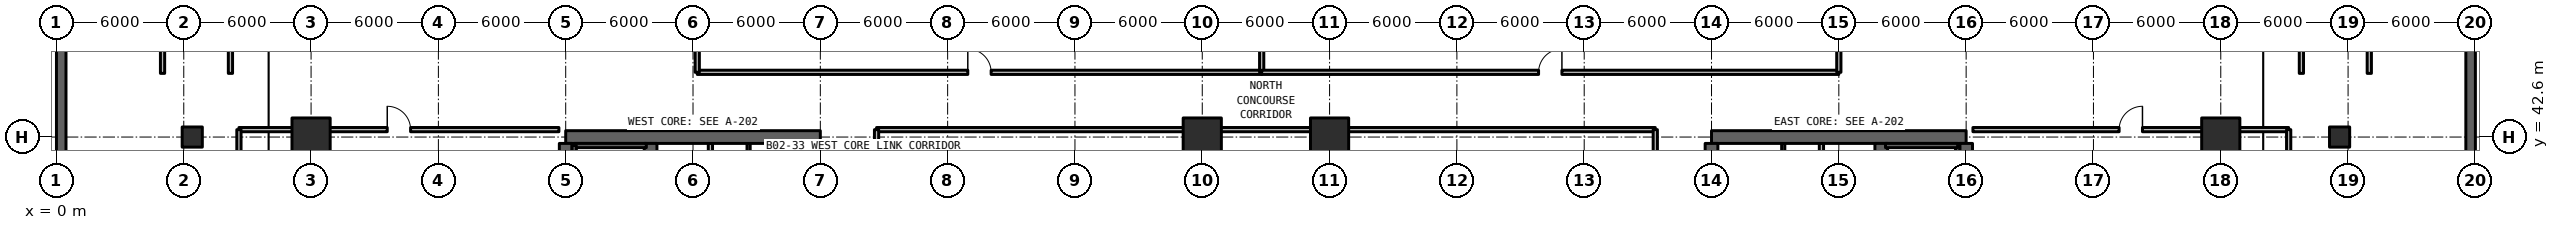
"""IFC4 building model, lengths in metres.
Left out: names, types, materials, properties, quantities, classifications, styles, units other than length and angle.
Written with IfcOpenShell. Run it as: python <this file> out.ifc"""

import sys

from ifc_helpers import new_model, si_unit, direction, frame, frame_2d, origin, origin_2d, place, context, subcontext, project, spatial, rectangle, extrude, element, fill, save


model = new_model("IFC4")
c1 = context("Model", 3, precision=1e-05, world=origin(), true_north=direction((0.0, 1.0)))
c2 = subcontext(c1, "Body", "Model", "MODEL_VIEW")
j1 = project(units=[si_unit("LENGTHUNIT", "METRE"), si_unit("PLANEANGLEUNIT", "RADIAN")], contexts=[c1])
p1 = place(None, origin())
s1 = spatial("IfcSite", under=j1, at=p1, CompositionType="ELEMENT")
p2 = place(p1, origin())
s2 = spatial("IfcBuilding", under=s1, at=p2, CompositionType="ELEMENT")
p3 = place(p2, frame((0.0, 0.0, -9.24)))
s3 = spatial("IfcBuildingStorey", under=s2, at=p3, CompositionType="ELEMENT", Elevation=-9.24)
p4 = place(p3, frame((36.0, 42.6, 0.0), z_axis=(0.0, 0.0, 1.0), x_axis=(-1.0, 0.0, 0.0)))
e1 = element("IfcWall", 1, at=p4, inside=s3, PredefinedType="SHEAR", context=c2, shape_type="SweptSolid", body=[
    extrude(rectangle(XDim=12.0, YDim=0.6, at=frame_2d((6.0, 0.0))), origin(), (0.0, 0.0, 1.0), 4.62),
])
p5 = place(p3, frame((24.0, 24.9, 0.0), z_axis=(0.0, 0.0, 1.0), x_axis=(0.0, 1.0, 0.0)))
e2 = element("IfcWall", 2, at=p5, inside=s3, PredefinedType="SHEAR", context=c2, shape_type="SweptSolid", body=[
    extrude(rectangle(XDim=17.4, YDim=0.6, at=frame_2d((8.7, 0.0))), origin(), (0.0, 0.0, 1.0), 4.62),
])
p6 = place(p3, frame((36.0, 36.8, 0.0), z_axis=(0.0, 0.0, 1.0), x_axis=(0.0, 1.0, 0.0)))
e3 = element("IfcWall", 3, at=p6, inside=s3, PredefinedType="SHEAR", context=c2, shape_type="SweptSolid", body=[
    extrude(rectangle(XDim=5.5, YDim=0.6, at=frame_2d((2.75, 0.0))), origin(), (0.0, 0.0, 1.0), 4.62),
])
p7 = place(p3, frame((28.0, 24.9, 0.0), z_axis=(0.0, 0.0, 1.0), x_axis=(0.0, 1.0, 0.0)))
e4 = element("IfcWall", 4, at=p7, inside=s3, PredefinedType="SHEAR", context=c2, shape_type="SweptSolid", body=[
    extrude(rectangle(XDim=17.4, YDim=0.6, at=frame_2d((8.7, 0.0))), origin(), (0.0, 0.0, 1.0), 4.62),
])
p8 = place(p7, frame((0.35, 0.0, 0.0)))
e5 = element("IfcOpeningElement", 5, at=p8, cuts=e4, PredefinedType="OPENING", context=c2, shape_type="SweptSolid", body=[
    extrude(rectangle(XDim=1.15, YDim=2.15, at=frame_2d((0.575, 1.075))), frame((0.0, 0.31, 0.0), z_axis=(0.0, -1.0, 0.0), x_axis=(1.0, 0.0, 0.0)), (0.0, 0.0, 1.0), 0.62),
])
p9 = place(p7, frame((9.55, 0.0, 0.0)))
e6 = element("IfcOpeningElement", 6, at=p9, cuts=e4, PredefinedType="OPENING", context=c2, shape_type="SweptSolid", body=[
    extrude(rectangle(XDim=1.15, YDim=2.15, at=frame_2d((0.575, 1.075))), frame((0.0, 0.31, 0.0), z_axis=(0.0, -1.0, 0.0), x_axis=(1.0, 0.0, 0.0)), (0.0, 0.0, 1.0), 0.62),
])
p10 = place(p3, frame((90.0, 42.6, 0.0), z_axis=(0.0, 0.0, 1.0), x_axis=(-1.0, 0.0, 0.0)))
e7 = element("IfcWall", 7, at=p10, inside=s3, PredefinedType="SHEAR", context=c2, shape_type="SweptSolid", body=[
    extrude(rectangle(XDim=12.0, YDim=0.6, at=frame_2d((6.0, 0.0))), origin(), (0.0, 0.0, 1.0), 4.62),
])
p11 = place(p3, frame((90.0, 24.9, 0.0), z_axis=(0.0, 0.0, 1.0), x_axis=(0.0, 1.0, 0.0)))
e8 = element("IfcWall", 8, at=p11, inside=s3, PredefinedType="SHEAR", context=c2, shape_type="SweptSolid", body=[
    extrude(rectangle(XDim=17.4, YDim=0.6, at=frame_2d((8.7, 0.0))), origin(), (0.0, 0.0, 1.0), 4.62),
])
p12 = place(p3, frame((78.0, 36.8, 0.0), z_axis=(0.0, 0.0, 1.0), x_axis=(0.0, 1.0, 0.0)))
e9 = element("IfcWall", 9, at=p12, inside=s3, PredefinedType="SHEAR", context=c2, shape_type="SweptSolid", body=[
    extrude(rectangle(XDim=5.5, YDim=0.6, at=frame_2d((2.75, 0.0))), origin(), (0.0, 0.0, 1.0), 4.62),
])
p13 = place(p3, frame((86.0, 24.9, 0.0), z_axis=(0.0, 0.0, 1.0), x_axis=(0.0, 1.0, 0.0)))
e10 = element("IfcWall", 10, at=p13, inside=s3, PredefinedType="SHEAR", context=c2, shape_type="SweptSolid", body=[
    extrude(rectangle(XDim=17.4, YDim=0.6, at=frame_2d((8.7, 0.0))), origin(), (0.0, 0.0, 1.0), 4.62),
])
p14 = place(p13, frame((0.35, 0.0, 0.0)))
e11 = element("IfcOpeningElement", 11, at=p14, cuts=e10, PredefinedType="OPENING", context=c2, shape_type="SweptSolid", body=[
    extrude(rectangle(XDim=1.15, YDim=2.15, at=frame_2d((0.575, 1.075))), frame((0.0, 0.31, 0.0), z_axis=(0.0, -1.0, 0.0), x_axis=(1.0, 0.0, 0.0)), (0.0, 0.0, 1.0), 0.62),
])
p15 = place(p13, frame((9.55, 0.0, 0.0)))
e12 = element("IfcOpeningElement", 12, at=p15, cuts=e10, PredefinedType="OPENING", context=c2, shape_type="SweptSolid", body=[
    extrude(rectangle(XDim=1.15, YDim=2.15, at=frame_2d((0.575, 1.075))), frame((0.0, 0.31, 0.0), z_axis=(0.0, -1.0, 0.0), x_axis=(1.0, 0.0, 0.0)), (0.0, 0.0, 1.0), 0.62),
])
for number, where, z_axis, x_axis in (
    (13, (12.0, 42.6, 0.0), (0.0, 0.0, 1.0), (1.0, 0.0, 0.0)),
    (14, (54.0, 42.6, 0.0), (0.0, 0.0, 1.0), (1.0, 0.0, 0.0)),
    (15, (60.0, 42.6, 0.0), (0.0, 0.0, 1.0), (1.0, 0.0, 0.0)),
    (16, (102.0, 42.6, 0.0), (0.0, 0.0, 1.0), (1.0, 0.0, 0.0)),
):
    element("IfcColumn", number, at=place(p3, frame(where, z_axis=z_axis, x_axis=x_axis)), inside=s3, PredefinedType="COLUMN", context=c2, shape_type="SweptSolid", body=[
        extrude(rectangle(XDim=1.8, YDim=1.8, at=origin_2d()), origin(), (0.0, 0.0, 1.0), 4.62),
    ])
for number, where, z_axis, x_axis in (
    (17, (6.4, 42.6, 0.0), (0.0, 0.0, 1.0), (1.0, 0.0, 0.0)),
    (18, (107.6, 42.6, 0.0), (0.0, 0.0, 1.0), (1.0, 0.0, 0.0)),
):
    element("IfcColumn", number, at=place(p3, frame(where, z_axis=z_axis, x_axis=x_axis)), inside=s3, PredefinedType="COLUMN", context=c2, shape_type="SweptSolid", body=[
        extrude(rectangle(XDim=0.95, YDim=0.95, at=origin_2d()), origin(), (0.0, 0.0, 1.0), 4.62),
    ])
for number, where, z_axis, x_axis in (
    (19, (113.775, 0.225, 0.0), (0.0, 0.0, 1.0), (0.0, 1.0, 0.0)),
    (20, (0.225, 66.975, 0.0), (0.0, 0.0, 1.0), (0.0, -1.0, 0.0)),
):
    element("IfcWall", number, at=place(p3, frame(where, z_axis=z_axis, x_axis=x_axis)), inside=s3, PredefinedType="USERDEFINED", context=c2, shape_type="SweptSolid", body=[
        extrude(rectangle(XDim=66.75, YDim=0.45, at=frame_2d((33.375, 0.0))), origin(), (0.0, 0.0, 1.0), 4.32),
    ])
p16 = place(p3, frame((30.82, 36.88, 0.0), z_axis=(0.0, 0.0, 1.0), x_axis=(0.0, 1.0, 0.0)))
e21 = element("IfcWall", 21, at=p16, inside=s3, PredefinedType="SOLIDWALL", context=c2, shape_type="SweptSolid", body=[
    extrude(rectangle(XDim=5.42, YDim=0.2, at=frame_2d((2.71, 0.0))), origin(), (0.0, 0.0, 1.0), 3.54),
])
p17 = place(p16, frame((2.1, 0.0, 0.0)))
e22 = element("IfcOpeningElement", 22, at=p17, cuts=e21, PredefinedType="OPENING", context=c2, shape_type="SweptSolid", body=[
    extrude(rectangle(XDim=0.95, YDim=2.15, at=frame_2d((0.475, 1.075))), frame((0.0, 0.11, 0.0), z_axis=(0.0, -1.0, 0.0), x_axis=(1.0, 0.0, 0.0)), (0.0, 0.0, 1.0), 0.22),
])
p18 = place(p3, frame((32.62, 36.88, 0.0), z_axis=(0.0, 0.0, 1.0), x_axis=(0.0, 1.0, 0.0)))
e23 = element("IfcWall", 23, at=p18, inside=s3, PredefinedType="SOLIDWALL", context=c2, shape_type="SweptSolid", body=[
    extrude(rectangle(XDim=5.42, YDim=0.15, at=frame_2d((2.71, 0.0))), origin(), (0.0, 0.0, 1.0), 3.54),
])
p19 = place(p18, frame((0.8, 0.0, 0.0)))
e24 = element("IfcOpeningElement", 24, at=p19, cuts=e23, PredefinedType="OPENING", context=c2, shape_type="SweptSolid", body=[
    extrude(rectangle(XDim=0.95, YDim=2.15, at=frame_2d((0.475, 1.075))), frame((0.0, 0.085, 0.0), z_axis=(0.0, -1.0, 0.0), x_axis=(1.0, 0.0, 0.0)), (0.0, 0.0, 1.0), 0.17),
])
p20 = place(p18, frame((3.55, 0.0, 0.0)))
e25 = element("IfcOpeningElement", 25, at=p20, cuts=e23, PredefinedType="OPENING", context=c2, shape_type="SweptSolid", body=[
    extrude(rectangle(XDim=0.95, YDim=2.15, at=frame_2d((0.475, 1.075))), frame((0.0, 0.085, 0.0), z_axis=(0.0, -1.0, 0.0), x_axis=(1.0, 0.0, 0.0)), (0.0, 0.0, 1.0), 0.17),
])
p21 = place(p3, frame((83.18, 36.88, 0.0), z_axis=(0.0, 0.0, 1.0), x_axis=(0.0, 1.0, 0.0)))
e26 = element("IfcWall", 26, at=p21, inside=s3, PredefinedType="SOLIDWALL", context=c2, shape_type="SweptSolid", body=[
    extrude(rectangle(XDim=5.42, YDim=0.2, at=frame_2d((2.71, 0.0))), origin(), (0.0, 0.0, 1.0), 3.54),
])
p22 = place(p21, frame((2.1, 0.0, 0.0)))
e27 = element("IfcOpeningElement", 27, at=p22, cuts=e26, PredefinedType="OPENING", context=c2, shape_type="SweptSolid", body=[
    extrude(rectangle(XDim=0.95, YDim=2.15, at=frame_2d((0.475, 1.075))), frame((0.0, 0.11, 0.0), z_axis=(0.0, -1.0, 0.0), x_axis=(1.0, 0.0, 0.0)), (0.0, 0.0, 1.0), 0.22),
])
p23 = place(p3, frame((81.38, 36.88, 0.0), z_axis=(0.0, 0.0, 1.0), x_axis=(0.0, 1.0, 0.0)))
e28 = element("IfcWall", 28, at=p23, inside=s3, PredefinedType="SOLIDWALL", context=c2, shape_type="SweptSolid", body=[
    extrude(rectangle(XDim=5.42, YDim=0.15, at=frame_2d((2.71, 0.0))), origin(), (0.0, 0.0, 1.0), 3.54),
])
p24 = place(p23, frame((0.8, 0.0, 0.0)))
e29 = element("IfcOpeningElement", 29, at=p24, cuts=e28, PredefinedType="OPENING", context=c2, shape_type="SweptSolid", body=[
    extrude(rectangle(XDim=0.95, YDim=2.15, at=frame_2d((0.475, 1.075))), frame((0.0, 0.085, 0.0), z_axis=(0.0, -1.0, 0.0), x_axis=(1.0, 0.0, 0.0)), (0.0, 0.0, 1.0), 0.17),
])
p25 = place(p23, frame((3.55, 0.0, 0.0)))
e30 = element("IfcOpeningElement", 30, at=p25, cuts=e28, PredefinedType="OPENING", context=c2, shape_type="SweptSolid", body=[
    extrude(rectangle(XDim=0.95, YDim=2.15, at=frame_2d((0.475, 1.075))), frame((0.0, 0.085, 0.0), z_axis=(0.0, -1.0, 0.0), x_axis=(1.0, 0.0, 0.0)), (0.0, 0.0, 1.0), 0.17),
])
for number, where, z_axis, x_axis in (
    (31, (5.0, 45.6, 0.0), (0.0, 0.0, 1.0), (0.0, 1.0, 0.0)),
    (32, (8.2, 45.6, 0.0), (0.0, 0.0, 1.0), (0.0, 1.0, 0.0)),
    (33, (105.8, 45.6, 0.0), (0.0, 0.0, 1.0), (0.0, 1.0, 0.0)),
    (34, (109.0, 45.6, 0.0), (0.0, 0.0, 1.0), (0.0, 1.0, 0.0)),
):
    element("IfcWall", number, at=place(p3, frame(where, z_axis=z_axis, x_axis=x_axis)), inside=s3, PredefinedType="SOLIDWALL", context=c2, shape_type="SweptSolid", body=[
        extrude(rectangle(XDim=5.7, YDim=0.2, at=frame_2d((2.85, 0.0))), origin(), (0.0, 0.0, 1.0), 3.54),
    ])
p26 = place(p3, frame((38.65, 42.95, 0.0), z_axis=(0.0, 0.0, 1.0), x_axis=(1.0, 0.0, 0.0)))
e35 = element("IfcWall", 35, at=p26, inside=s3, PredefinedType="SOLIDWALL", context=c2, shape_type="SweptSolid", body=[
    extrude(rectangle(XDim=36.7, YDim=0.2, at=frame_2d((18.35, 0.0))), origin(), (0.0, 0.0, 1.0), 3.54),
])
p27 = place(p3, frame((38.65, 24.25, 0.0), z_axis=(0.0, 0.0, 1.0), x_axis=(0.0, 1.0, 0.0)))
e36 = element("IfcWall", 36, at=p27, inside=s3, PredefinedType="SOLIDWALL", context=c2, shape_type="SweptSolid", body=[
    extrude(rectangle(XDim=18.7, YDim=0.2, at=frame_2d((9.35, 0.0))), origin(), (0.0, 0.0, 1.0), 3.54),
])
p28 = place(p27, frame((8.45, 0.0, 0.0)))
e37 = element("IfcOpeningElement", 37, at=p28, cuts=e36, PredefinedType="OPENING", context=c2, shape_type="SweptSolid", body=[
    extrude(rectangle(XDim=1.1, YDim=2.15, at=frame_2d((0.55, 1.075))), frame((0.0, 0.11, 0.0), z_axis=(0.0, -1.0, 0.0), x_axis=(1.0, 0.0, 0.0)), (0.0, 0.0, 1.0), 0.22),
])
p29 = place(p3, frame((75.35, 24.25, 0.0), z_axis=(0.0, 0.0, 1.0), x_axis=(0.0, 1.0, 0.0)))
e38 = element("IfcWall", 38, at=p29, inside=s3, PredefinedType="SOLIDWALL", context=c2, shape_type="SweptSolid", body=[
    extrude(rectangle(XDim=18.7, YDim=0.2, at=frame_2d((9.35, 0.0))), origin(), (0.0, 0.0, 1.0), 3.54),
])
p30 = place(p3, frame((8.6, 42.95, 0.0), z_axis=(0.0, 0.0, 1.0), x_axis=(1.0, 0.0, 0.0)))
e39 = element("IfcWall", 39, at=p30, inside=s3, PredefinedType="SOLIDWALL", context=c2, shape_type="SweptSolid", body=[
    extrude(rectangle(XDim=15.08, YDim=0.2, at=frame_2d((7.54, 0.0))), origin(), (0.0, 0.0, 1.0), 3.54),
])
p31 = place(p30, frame((6.99, 0.0, 0.0)))
e40 = element("IfcOpeningElement", 40, at=p31, cuts=e39, PredefinedType="OPENING", context=c2, shape_type="SweptSolid", body=[
    extrude(rectangle(XDim=1.1, YDim=2.15, at=frame_2d((0.55, 1.075))), frame((0.0, 0.11, 0.0), z_axis=(0.0, -1.0, 0.0), x_axis=(1.0, 0.0, 0.0)), (0.0, 0.0, 1.0), 0.22),
])
p32 = place(p3, frame((8.6, 33.4, 0.0), z_axis=(0.0, 0.0, 1.0), x_axis=(0.0, 1.0, 0.0)))
e41 = element("IfcWall", 41, at=p32, inside=s3, PredefinedType="SOLIDWALL", context=c2, shape_type="SweptSolid", body=[
    extrude(rectangle(XDim=9.55, YDim=0.2, at=frame_2d((4.775, 0.0))), origin(), (0.0, 0.0, 1.0), 3.54),
])
p33 = place(p3, frame((90.32, 42.95, 0.0), z_axis=(0.0, 0.0, 1.0), x_axis=(1.0, 0.0, 0.0)))
e42 = element("IfcWall", 42, at=p33, inside=s3, PredefinedType="SOLIDWALL", context=c2, shape_type="SweptSolid", body=[
    extrude(rectangle(XDim=14.88, YDim=0.2, at=frame_2d((7.44, 0.0))), origin(), (0.0, 0.0, 1.0), 3.54),
])
p34 = place(p33, frame((6.89, 0.0, 0.0)))
e43 = element("IfcOpeningElement", 43, at=p34, cuts=e42, PredefinedType="OPENING", context=c2, shape_type="SweptSolid", body=[
    extrude(rectangle(XDim=1.1, YDim=2.15, at=frame_2d((0.55, 1.075))), frame((0.0, 0.11, 0.0), z_axis=(0.0, -1.0, 0.0), x_axis=(1.0, 0.0, 0.0)), (0.0, 0.0, 1.0), 0.22),
])
p35 = place(p3, frame((105.2, 24.25, 0.0), z_axis=(0.0, 0.0, 1.0), x_axis=(0.0, 1.0, 0.0)))
e44 = element("IfcWall", 44, at=p35, inside=s3, PredefinedType="SOLIDWALL", context=c2, shape_type="SweptSolid", body=[
    extrude(rectangle(XDim=18.7, YDim=0.2, at=frame_2d((9.35, 0.0))), origin(), (0.0, 0.0, 1.0), 3.54),
])
p36 = place(p3, frame((30.2, 45.65, 0.0), z_axis=(0.0, 0.0, 1.0), x_axis=(1.0, 0.0, 0.0)))
e45 = element("IfcWall", 45, at=p36, inside=s3, PredefinedType="SOLIDWALL", context=c2, shape_type="SweptSolid", body=[
    extrude(rectangle(XDim=26.6, YDim=0.2, at=frame_2d((13.3, 0.0))), origin(), (0.0, 0.0, 1.0), 3.54),
])
p37 = place(p36, frame((12.75, 0.0, 0.0)))
e46 = element("IfcOpeningElement", 46, at=p37, cuts=e45, PredefinedType="OPENING", context=c2, shape_type="SweptSolid", body=[
    extrude(rectangle(XDim=1.1, YDim=2.15, at=frame_2d((0.55, 1.075))), frame((0.0, 0.11, 0.0), z_axis=(0.0, -1.0, 0.0), x_axis=(1.0, 0.0, 0.0)), (0.0, 0.0, 1.0), 0.22),
])
for number, where, z_axis, x_axis in (
    (47, (30.2, 45.65, 0.0), (0.0, 0.0, 1.0), (0.0, 1.0, 0.0)),
    (48, (56.8, 45.65, 0.0), (0.0, 0.0, 1.0), (0.0, 1.0, 0.0)),
):
    element("IfcWall", number, at=place(p3, frame(where, z_axis=z_axis, x_axis=x_axis)), inside=s3, PredefinedType="SOLIDWALL", context=c2, shape_type="SweptSolid", body=[
        extrude(rectangle(XDim=21.1, YDim=0.2, at=frame_2d((10.55, 0.0))), origin(), (0.0, 0.0, 1.0), 3.54),
    ])
p38 = place(p3, frame((56.8, 45.65, 0.0), z_axis=(0.0, 0.0, 1.0), x_axis=(1.0, 0.0, 0.0)))
e49 = element("IfcWall", 49, at=p38, inside=s3, PredefinedType="SOLIDWALL", context=c2, shape_type="SweptSolid", body=[
    extrude(rectangle(XDim=27.2, YDim=0.2, at=frame_2d((13.6, 0.0))), origin(), (0.0, 0.0, 1.0), 3.54),
])
p39 = place(p38, frame((13.05, 0.0, 0.0)))
e50 = element("IfcOpeningElement", 50, at=p39, cuts=e49, PredefinedType="OPENING", context=c2, shape_type="SweptSolid", body=[
    extrude(rectangle(XDim=1.1, YDim=2.15, at=frame_2d((0.55, 1.075))), frame((0.0, 0.11, 0.0), z_axis=(0.0, -1.0, 0.0), x_axis=(1.0, 0.0, 0.0)), (0.0, 0.0, 1.0), 0.22),
])
p40 = place(p3, frame((84.0, 45.65, 0.0), z_axis=(0.0, 0.0, 1.0), x_axis=(0.0, 1.0, 0.0)))
e51 = element("IfcWall", 51, at=p40, inside=s3, PredefinedType="SOLIDWALL", context=c2, shape_type="SweptSolid", body=[
    extrude(rectangle(XDim=21.1, YDim=0.2, at=frame_2d((10.55, 0.0))), origin(), (0.0, 0.0, 1.0), 3.54),
])
p41 = place(p3, frame((27.8, 42.2, 0.0), z_axis=(0.0, 0.0, 1.0), x_axis=(-1.0, 0.0, 0.0)))
e52 = element("IfcWall", 52, at=p41, inside=s3, PredefinedType="SOLIDWALL", context=c2, shape_type="SweptSolid", body=[
    extrude(rectangle(XDim=3.4, YDim=0.2, at=frame_2d((1.7, 0.0))), origin(), (0.0, 0.0, 1.0), 4.62),
])
for number, where, z_axis, x_axis in (
    (53, (24.4, 42.2, 0.0), (0.0, 0.0, 1.0), (0.0, -1.0, 0.0)),
    (54, (89.6, 34.2, 0.0), (0.0, 0.0, 1.0), (0.0, 1.0, 0.0)),
):
    element("IfcWall", number, at=place(p3, frame(where, z_axis=z_axis, x_axis=x_axis)), inside=s3, PredefinedType="SOLIDWALL", context=c2, shape_type="SweptSolid", body=[
        extrude(rectangle(XDim=8.0, YDim=0.2, at=frame_2d((4.0, 0.0))), origin(), (0.0, 0.0, 1.0), 4.62),
    ])
p42 = place(p3, frame((89.6, 42.2, 0.0), z_axis=(0.0, 0.0, 1.0), x_axis=(-1.0, 0.0, 0.0)))
e55 = element("IfcWall", 55, at=p42, inside=s3, PredefinedType="SOLIDWALL", context=c2, shape_type="SweptSolid", body=[
    extrude(rectangle(XDim=3.4, YDim=0.2, at=frame_2d((1.7, 0.0))), origin(), (0.0, 0.0, 1.0), 4.62),
])
p43 = place(p31, origin())
e56 = element("IfcDoor", 56, at=p43, inside=s3, OperationType="SINGLE_SWING_LEFT", PredefinedType="DOOR", context=c2, shape_type="SweptSolid", body=[
    extrude(rectangle(XDim=1.1, YDim=2.15, at=frame_2d((0.55, 1.075))), frame((0.0, 0.025, 0.0), z_axis=(0.0, -1.0, 0.0), x_axis=(1.0, 0.0, 0.0)), (0.0, 0.0, 1.0), 0.05),
])
fill(e40, e56)
p44 = place(p34, origin())
e57 = element("IfcDoor", 57, at=p44, inside=s3, OperationType="SINGLE_SWING_RIGHT", PredefinedType="DOOR", context=c2, shape_type="SweptSolid", body=[
    extrude(rectangle(XDim=1.1, YDim=2.15, at=frame_2d((0.55, 1.075))), frame((0.0, 0.025, 0.0), z_axis=(0.0, -1.0, 0.0), x_axis=(1.0, 0.0, 0.0)), (0.0, 0.0, 1.0), 0.05),
])
fill(e43, e57)
p45 = place(p37, origin())
e58 = element("IfcDoor", 58, at=p45, inside=s3, OperationType="SINGLE_SWING_LEFT", PredefinedType="DOOR", context=c2, shape_type="SweptSolid", body=[
    extrude(rectangle(XDim=1.1, YDim=2.15, at=frame_2d((0.55, 1.075))), frame((0.0, 0.025, 0.0), z_axis=(0.0, -1.0, 0.0), x_axis=(1.0, 0.0, 0.0)), (0.0, 0.0, 1.0), 0.05),
])
fill(e46, e58)
p46 = place(p39, origin())
e59 = element("IfcDoor", 59, at=p46, inside=s3, OperationType="SINGLE_SWING_RIGHT", PredefinedType="DOOR", context=c2, shape_type="SweptSolid", body=[
    extrude(rectangle(XDim=1.1, YDim=2.15, at=frame_2d((0.55, 1.075))), frame((0.0, 0.025, 0.0), z_axis=(0.0, -1.0, 0.0), x_axis=(1.0, 0.0, 0.0)), (0.0, 0.0, 1.0), 0.05),
])
fill(e50, e59)
save(model, sys.argv[1])
